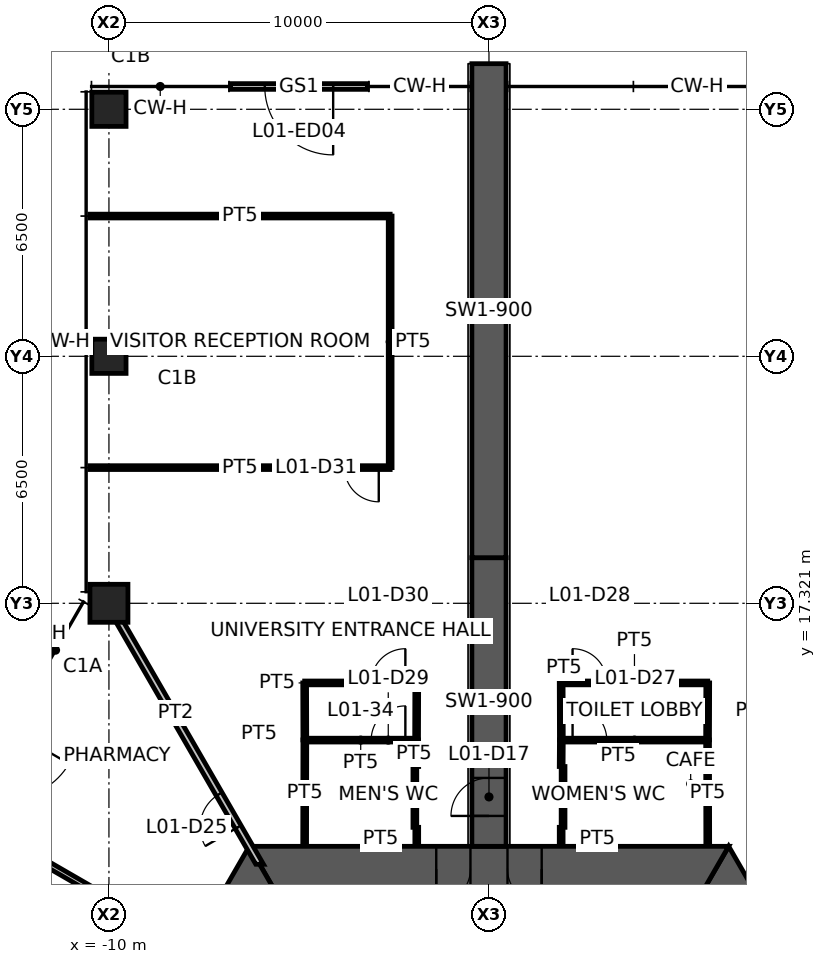
"""IFC4 building model, lengths in metres.
Left out: names, types, materials, properties, quantities, classifications, styles, units other than length and angle.
Written with IfcOpenShell. Run it as: python <this file> out.ifc"""

import sys

from ifc_helpers import new_model, si_unit, direction, frame, frame_2d, origin, origin_2d, place, context, subcontext, project, spatial, polyline, rectangle, hollow_rectangle, outline, extrude, element, fill, save


model = new_model("IFC4")
c1 = context("Model", 3, precision=1e-05, world=origin(), true_north=direction((0.0, 1.0)))
c2 = subcontext(c1, "Body", "Model", "MODEL_VIEW")
j1 = project(units=[si_unit("LENGTHUNIT", "METRE"), si_unit("PLANEANGLEUNIT", "RADIAN")], contexts=[c1])
p1 = place(None, origin())
s1 = spatial("IfcSite", under=j1, at=p1, CompositionType="ELEMENT")
p2 = place(p1, origin())
s2 = spatial("IfcBuilding", under=s1, at=p2, CompositionType="ELEMENT")
p3 = place(p2, origin())
s3 = spatial("IfcBuildingStorey", under=s2, at=p3, CompositionType="ELEMENT", Elevation=0.0)
p4 = place(p3, frame((-10.0, 17.321, 0.0), z_axis=(0.0, 0.0, 1.0), x_axis=(1.0, 0.0, 0.0)))
e1 = element("IfcColumn", 1, at=p4, inside=s3, PredefinedType="COLUMN", context=c2, shape_type="SweptSolid", body=[
    extrude(hollow_rectangle(XDim=1.0, YDim=1.0, WallThickness=0.06, at=origin_2d()), origin(), (0.0, 0.0, 1.0), 5.5),
])
for number, where, z_axis, x_axis in (
    (2, (-10.0, 23.821, 0.0), (0.0, 0.0, 1.0), (1.0, 0.0, 0.0)),
    (3, (-10.0, 30.321, 0.0), (0.0, 0.0, 1.0), (1.0, 0.0, 0.0)),
):
    element("IfcColumn", number, at=place(p3, frame(where, z_axis=z_axis, x_axis=x_axis)), inside=s3, PredefinedType="COLUMN", context=c2, shape_type="SweptSolid", body=[
        extrude(hollow_rectangle(XDim=0.9, YDim=0.9, WallThickness=0.05, at=origin_2d()), origin(), (0.0, 0.0, 1.0), 5.5),
    ])
p5 = place(p3, frame((11.922, 0.0, 0.0), z_axis=(0.0, 0.0, 1.0), x_axis=(-0.500004296715, 0.866022923061, 0.0)))
e4 = element("IfcWall", 4, at=p5, inside=s3, PredefinedType="SHEAR", context=c2, shape_type="SweptSolid", body=[
    extrude(outline(polyline([(-0.346, -0.6), (5.835, -0.6), (6.635, -0.6), (12.269, -0.6), (11.576, 0.6), (6.635, 0.6), (5.835, 0.6), (0.346, 0.6), (-0.346, -0.6)])), origin(), (0.0, 0.0, 1.0), 5.5),
])
p6 = place(p5, frame((5.835, 0.0, 0.0)))
e5 = element("IfcOpeningElement", 5, at=p6, cuts=e4, PredefinedType="OPENING", context=c2, shape_type="SweptSolid", body=[
    extrude(rectangle(XDim=0.8, YDim=2.1, at=frame_2d((0.4, 1.05))), frame((0.0, 0.61, 0.0), z_axis=(0.0, -1.0, 0.0), x_axis=(1.0, 0.0, 0.0)), (0.0, 0.0, 1.0), 1.22),
])
p7 = place(p3, frame((5.961, 10.325, 0.0), z_axis=(0.0, 0.0, 1.0), x_axis=(-1.0, 0.0, 0.0)))
e6 = element("IfcWall", 6, at=p7, inside=s3, PredefinedType="SHEAR", context=c2, shape_type="SweptSolid", body=[
    extrude(outline(polyline([(-0.346, -0.6), (4.574, -0.6), (5.474, -0.6), (6.449, -0.6), (7.349, -0.6), (12.269, -0.6), (11.576, 0.6), (7.349, 0.6), (6.449, 0.6), (5.474, 0.6), (4.574, 0.6), (0.346, 0.6), (-0.346, -0.6)])), origin(), (0.0, 0.0, 1.0), 5.5),
])
p8 = place(p7, frame((6.449, 0.0, 0.0)))
e7 = element("IfcOpeningElement", 7, at=p8, cuts=e6, PredefinedType="OPENING", context=c2, shape_type="SweptSolid", body=[
    extrude(rectangle(XDim=0.9, YDim=2.1, at=frame_2d((0.45, 1.05))), frame((0.0, 0.61, 0.0), z_axis=(0.0, -1.0, 0.0), x_axis=(1.0, 0.0, 0.0)), (0.0, 0.0, 1.0), 1.22),
])
p9 = place(p7, frame((4.574, 0.0, 0.0)))
e8 = element("IfcOpeningElement", 8, at=p9, cuts=e6, PredefinedType="OPENING", context=c2, shape_type="SweptSolid", body=[
    extrude(rectangle(XDim=0.9, YDim=2.1, at=frame_2d((0.45, 1.05))), frame((0.0, 0.61, 0.0), z_axis=(0.0, -1.0, 0.0), x_axis=(1.0, 0.0, 0.0)), (0.0, 0.0, 1.0), 1.22),
])
p10 = place(p3, frame((-5.961, 10.325, 0.0), z_axis=(0.0, 0.0, 1.0), x_axis=(-0.500004296715, -0.866022923061, 0.0)))
e9 = element("IfcWall", 9, at=p10, inside=s3, PredefinedType="SHEAR", context=c2, shape_type="SweptSolid", body=[
    extrude(outline(polyline([(-0.346, -0.6), (3.541, -0.6), (4.541, -0.6), (5.461, -0.6), (6.461, -0.6), (12.269, -0.6), (11.576, 0.6), (6.461, 0.6), (5.461, 0.6), (4.541, 0.6), (3.541, 0.6), (0.346, 0.6), (-0.346, -0.6)])), origin(), (0.0, 0.0, 1.0), 5.5),
])
p11 = place(p10, frame((3.541, 0.0, 0.0)))
e10 = element("IfcOpeningElement", 10, at=p11, cuts=e9, PredefinedType="OPENING", context=c2, shape_type="SweptSolid", body=[
    extrude(rectangle(XDim=1.0, YDim=2.1, at=frame_2d((0.5, 1.05))), frame((0.0, 0.61, 0.0), z_axis=(0.0, -1.0, 0.0), x_axis=(1.0, 0.0, 0.0)), (0.0, 0.0, 1.0), 1.22),
])
p12 = place(p10, frame((5.461, 0.0, 0.0)))
e11 = element("IfcOpeningElement", 11, at=p12, cuts=e9, PredefinedType="OPENING", context=c2, shape_type="SweptSolid", body=[
    extrude(rectangle(XDim=1.0, YDim=2.1, at=frame_2d((0.5, 1.05))), frame((0.0, 0.61, 0.0), z_axis=(0.0, -1.0, 0.0), x_axis=(1.0, 0.0, 0.0)), (0.0, 0.0, 1.0), 1.22),
])
p13 = place(p3, frame((0.0, 10.925, 0.0), z_axis=(0.0, 0.0, 1.0), x_axis=(0.0, 1.0, 0.0)))
e12 = element("IfcWall", 12, at=p13, inside=s3, PredefinedType="SHEAR", context=c2, shape_type="SweptSolid", body=[
    extrude(rectangle(XDim=7.595, YDim=0.9, at=frame_2d((3.798, 0.0))), origin(), (0.0, 0.0, 1.0), 5.5),
])
p14 = place(p13, frame((0.8, 0.0, 0.0)))
e13 = element("IfcOpeningElement", 13, at=p14, cuts=e12, PredefinedType="OPENING", context=c2, shape_type="SweptSolid", body=[
    extrude(rectangle(XDim=1.0, YDim=2.1, at=frame_2d((0.5, 1.05))), frame((0.0, 0.46, 0.0), z_axis=(0.0, -1.0, 0.0), x_axis=(1.0, 0.0, 0.0)), (0.0, 0.0, 1.0), 0.92),
])
p15 = place(p3, frame((0.0, 18.521, 0.0), z_axis=(0.0, 0.0, 1.0), x_axis=(0.0, 1.0, 0.0)))
e14 = element("IfcWall", 14, at=p15, inside=s3, PredefinedType="SHEAR", context=c2, shape_type="SweptSolid", body=[
    extrude(rectangle(XDim=13.0, YDim=0.9, at=frame_2d((6.5, 0.0))), origin(), (0.0, 0.0, 1.0), 5.5),
])
p16 = place(p3, frame((-3.2, 30.92, 0.0), z_axis=(0.0, 0.0, 1.0), x_axis=(-1.0, 0.0, 0.0)))
e15 = element("IfcWall", 15, at=p16, inside=s3, PredefinedType="STANDARD", context=c2, shape_type="SweptSolid", body=[
    extrude(rectangle(XDim=3.6, YDim=0.15, at=frame_2d((1.8, 0.0))), origin(), (0.0, 0.0, 1.0), 5.5),
])
p17 = place(p16, frame((0.9, 0.0, 0.0)))
e16 = element("IfcOpeningElement", 16, at=p17, cuts=e15, PredefinedType="OPENING", context=c2, shape_type="SweptSolid", body=[
    extrude(rectangle(XDim=1.8, YDim=2.4, at=frame_2d((0.9, 1.2))), frame((0.0, 0.085, 0.0), z_axis=(0.0, -1.0, 0.0), x_axis=(1.0, 0.0, 0.0)), (0.0, 0.0, 1.0), 0.17),
])
p18 = place(p3, frame((-6.035, 10.453, 0.0), z_axis=(0.0, 0.0, 1.0), x_axis=(-0.499993402427, 0.866029212861, 0.0)))
e17 = element("IfcWall", 17, at=p18, inside=s3, PredefinedType="PARTITIONING", context=c2, shape_type="SweptSolid", body=[
    extrude(outline(polyline([(-0.051, -0.087), (1.129, -0.087), (2.129, -0.087), (7.93, -0.087), (7.93, 0.087), (2.129, 0.087), (1.129, 0.087), (0.051, 0.087), (-0.051, -0.087)])), origin(), (0.0, 0.0, 1.0), 4.6),
])
p19 = place(p18, frame((1.129, 0.0, 0.0)))
e18 = element("IfcOpeningElement", 18, at=p19, cuts=e17, PredefinedType="OPENING", context=c2, shape_type="SweptSolid", body=[
    extrude(rectangle(XDim=1.0, YDim=2.1, at=frame_2d((0.5, 1.05))), frame((0.0, 0.098, 0.0), z_axis=(0.0, -1.0, 0.0), x_axis=(1.0, 0.0, 0.0)), (0.0, 0.0, 1.0), 0.195),
])
p20 = place(p3, frame((1.9, 13.72, 0.0), z_axis=(0.0, 0.0, 1.0), x_axis=(1.0, 0.0, 0.0)))
e19 = element("IfcWall", 19, at=p20, inside=s3, PredefinedType="PARTITIONING", context=c2, shape_type="SweptSolid", body=[
    extrude(rectangle(XDim=3.857, YDim=0.1, at=frame_2d((1.929, 0.0))), origin(), (0.0, 0.0, 1.0), 4.5),
])
p21 = place(p20, frame((0.3, 0.0, 0.0)))
e20 = element("IfcOpeningElement", 20, at=p21, cuts=e19, PredefinedType="OPENING", context=c2, shape_type="SweptSolid", body=[
    extrude(rectangle(XDim=0.9, YDim=2.1, at=frame_2d((0.45, 1.05))), frame((0.0, 0.06, 0.0), z_axis=(0.0, -1.0, 0.0), x_axis=(1.0, 0.0, 0.0)), (0.0, 0.0, 1.0), 0.12),
])
p22 = place(p3, frame((1.9, 10.945, 0.0), z_axis=(0.0, 0.0, 1.0), x_axis=(0.0, 1.0, 0.0)))
e21 = element("IfcWall", 21, at=p22, inside=s3, PredefinedType="PARTITIONING", context=c2, shape_type="SweptSolid", body=[
    extrude(rectangle(XDim=0.48, YDim=0.1, at=frame_2d((0.24, 0.0))), origin(), (0.0, 0.0, 1.0), 4.5),
])
p23 = place(p3, frame((1.9, 13.025, 0.0), z_axis=(0.0, 0.0, 1.0), x_axis=(0.006624680291, 0.999978056565, 0.0)))
e22 = element("IfcWall", 22, at=p23, inside=s3, PredefinedType="PARTITIONING", context=c2, shape_type="SweptSolid", body=[
    extrude(rectangle(XDim=0.7, YDim=0.1, at=frame_2d((0.35, 0.0))), origin(), (0.0, 0.0, 1.0), 4.5),
])
p24 = place(p3, frame((1.95, 11.425, 0.0), z_axis=(0.0, 0.0, 1.0), x_axis=(0.0, 1.0, 0.0)))
e23 = element("IfcWall", 23, at=p24, inside=s3, PredefinedType="PARTITIONING", context=c2, shape_type="SweptSolid", body=[
    extrude(rectangle(XDim=1.6, YDim=0.1, at=frame_2d((0.8, 0.0))), origin(), (0.0, 0.0, 1.0), 4.5),
])
p25 = place(p3, frame((5.752, 13.725, 0.0), z_axis=(0.0, 0.0, 1.0), x_axis=(0.001756386155, -0.999998457553, 0.0)))
e24 = element("IfcWall", 24, at=p25, inside=s3, PredefinedType="PARTITIONING", context=c2, shape_type="SweptSolid", body=[
    extrude(rectangle(XDim=2.78, YDim=0.1, at=frame_2d((1.39, 0.0))), origin(), (0.0, 0.0, 1.0), 4.5),
])
p26 = place(p3, frame((1.9, 15.225, 0.0), z_axis=(0.0, 0.0, 1.0), x_axis=(1.0, 0.0, 0.0)))
e25 = element("IfcWall", 25, at=p26, inside=s3, PredefinedType="PARTITIONING", context=c2, shape_type="SweptSolid", body=[
    extrude(rectangle(XDim=3.857, YDim=0.1, at=frame_2d((1.929, 0.0))), origin(), (0.0, 0.0, 1.0), 4.5),
])
p27 = place(p26, frame((0.3, 0.0, 0.0)))
e26 = element("IfcOpeningElement", 26, at=p27, cuts=e25, PredefinedType="OPENING", context=c2, shape_type="SweptSolid", body=[
    extrude(rectangle(XDim=0.9, YDim=2.1, at=frame_2d((0.45, 1.05))), frame((0.0, 0.06, 0.0), z_axis=(0.0, -1.0, 0.0), x_axis=(1.0, 0.0, 0.0)), (0.0, 0.0, 1.0), 0.12),
])
for number, where, z_axis, x_axis in (
    (27, (1.905, 13.725, 0.0), (0.0, 0.0, 1.0), (-0.003, 1.0, 0.0)),
    (28, (5.757, 15.225, 0.0), (0.0, 0.0, 1.0), (-0.003, -1.0, 0.0)),
):
    element("IfcWall", number, at=place(p3, frame(where, z_axis=z_axis, x_axis=x_axis)), inside=s3, PredefinedType="PARTITIONING", context=c2, shape_type="SweptSolid", body=[
        extrude(rectangle(XDim=1.5, YDim=0.1, at=frame_2d((0.75, 0.0))), origin(), (0.0, 0.0, 1.0), 4.5),
    ])
p28 = place(p3, frame((-4.85, 13.72, 0.0), z_axis=(0.0, 0.0, 1.0), x_axis=(1.0, 0.0, 0.0)))
e29 = element("IfcWall", 29, at=p28, inside=s3, PredefinedType="PARTITIONING", context=c2, shape_type="SweptSolid", body=[
    extrude(rectangle(XDim=2.95, YDim=0.1, at=frame_2d((1.475, 0.0))), origin(), (0.0, 0.0, 1.0), 4.5),
])
p29 = place(p28, frame((1.75, 0.0, 0.0)))
e30 = element("IfcOpeningElement", 30, at=p29, cuts=e29, PredefinedType="OPENING", context=c2, shape_type="SweptSolid", body=[
    extrude(rectangle(XDim=0.9, YDim=2.1, at=frame_2d((0.45, 1.05))), frame((0.0, 0.06, 0.0), z_axis=(0.0, -1.0, 0.0), x_axis=(1.0, 0.0, 0.0)), (0.0, 0.0, 1.0), 0.12),
])
p30 = place(p3, frame((-4.85, 10.945, 0.0), z_axis=(0.0, 0.0, 1.0), x_axis=(0.001756386155, 0.999998457553, 0.0)))
e31 = element("IfcWall", 31, at=p30, inside=s3, PredefinedType="PARTITIONING", context=c2, shape_type="SweptSolid", body=[
    extrude(rectangle(XDim=2.78, YDim=0.1, at=frame_2d((1.39, 0.0))), origin(), (0.0, 0.0, 1.0), 4.5),
])
p31 = place(p3, frame((-1.95, 13.025, 0.0), z_axis=(0.0, 0.0, 1.0), x_axis=(0.0, -1.0, 0.0)))
e32 = element("IfcWall", 32, at=p31, inside=s3, PredefinedType="PARTITIONING", context=c2, shape_type="SweptSolid", body=[
    extrude(rectangle(XDim=1.6, YDim=0.1, at=frame_2d((0.8, 0.0))), origin(), (0.0, 0.0, 1.0), 4.5),
])
p32 = place(p3, frame((-1.905, 13.725, 0.0), z_axis=(0.0, 0.0, 1.0), x_axis=(0.006624680291, -0.999978056565, 0.0)))
e33 = element("IfcWall", 33, at=p32, inside=s3, PredefinedType="PARTITIONING", context=c2, shape_type="SweptSolid", body=[
    extrude(rectangle(XDim=0.7, YDim=0.1, at=frame_2d((0.35, 0.0))), origin(), (0.0, 0.0, 1.0), 4.5),
])
p33 = place(p3, frame((-1.9, 11.425, 0.0), z_axis=(0.0, 0.0, 1.0), x_axis=(0.0, -1.0, 0.0)))
e34 = element("IfcWall", 34, at=p33, inside=s3, PredefinedType="PARTITIONING", context=c2, shape_type="SweptSolid", body=[
    extrude(rectangle(XDim=0.48, YDim=0.1, at=frame_2d((0.24, 0.0))), origin(), (0.0, 0.0, 1.0), 4.5),
])
p34 = place(p3, frame((-4.85, 15.225, 0.0), z_axis=(0.0, 0.0, 1.0), x_axis=(1.0, 0.0, 0.0)))
e35 = element("IfcWall", 35, at=p34, inside=s3, PredefinedType="PARTITIONING", context=c2, shape_type="SweptSolid", body=[
    extrude(rectangle(XDim=2.95, YDim=0.1, at=frame_2d((1.475, 0.0))), origin(), (0.0, 0.0, 1.0), 4.5),
])
p35 = place(p34, frame((1.75, 0.0, 0.0)))
e36 = element("IfcOpeningElement", 36, at=p35, cuts=e35, PredefinedType="OPENING", context=c2, shape_type="SweptSolid", body=[
    extrude(rectangle(XDim=0.9, YDim=2.1, at=frame_2d((0.45, 1.05))), frame((0.0, 0.06, 0.0), z_axis=(0.0, -1.0, 0.0), x_axis=(1.0, 0.0, 0.0)), (0.0, 0.0, 1.0), 0.12),
])
for number, where, z_axis, x_axis in (
    (37, (-4.845, 13.725, 0.0), (0.0, 0.0, 1.0), (-0.003, 1.0, 0.0)),
    (38, (-1.9, 15.225, 0.0), (0.0, 0.0, 1.0), (-0.003, -1.0, 0.0)),
):
    element("IfcWall", number, at=place(p3, frame(where, z_axis=z_axis, x_axis=x_axis)), inside=s3, PredefinedType="PARTITIONING", context=c2, shape_type="SweptSolid", body=[
        extrude(rectangle(XDim=1.5, YDim=0.1, at=frame_2d((0.75, 0.0))), origin(), (0.0, 0.0, 1.0), 4.5),
    ])
p36 = place(p3, frame((-10.5, 27.511, 0.0), z_axis=(0.0, 0.0, 1.0), x_axis=(1.0, 0.0, 0.0)))
e39 = element("IfcWall", 39, at=p36, inside=s3, PredefinedType="PARTITIONING", context=c2, shape_type="SweptSolid", body=[
    extrude(rectangle(XDim=7.9, YDim=0.1, at=frame_2d((3.95, 0.0))), origin(), (0.0, 0.0, 1.0), 4.5),
])
p37 = place(p3, frame((-2.6, 20.891, 0.0), z_axis=(0.0, 0.0, 1.0), x_axis=(-1.0, 0.0, 0.0)))
e40 = element("IfcWall", 40, at=p37, inside=s3, PredefinedType="PARTITIONING", context=c2, shape_type="SweptSolid", body=[
    extrude(rectangle(XDim=7.9, YDim=0.1, at=frame_2d((3.95, 0.0))), origin(), (0.0, 0.0, 1.0), 4.5),
])
p38 = place(p37, frame((0.3, 0.0, 0.0)))
e41 = element("IfcOpeningElement", 41, at=p38, cuts=e40, PredefinedType="OPENING", context=c2, shape_type="SweptSolid", body=[
    extrude(rectangle(XDim=0.9, YDim=2.1, at=frame_2d((0.45, 1.05))), frame((0.0, 0.06, 0.0), z_axis=(0.0, -1.0, 0.0), x_axis=(1.0, 0.0, 0.0)), (0.0, 0.0, 1.0), 0.12),
])
p39 = place(p3, frame((-2.6, 27.511, 0.0), z_axis=(0.0, 0.0, 1.0), x_axis=(0.0, -1.0, 0.0)))
e42 = element("IfcWall", 42, at=p39, inside=s3, PredefinedType="PARTITIONING", context=c2, shape_type="SweptSolid", body=[
    extrude(rectangle(XDim=6.62, YDim=0.1, at=frame_2d((3.31, 0.0))), origin(), (0.0, 0.0, 1.0), 4.5),
])
p40 = place(p3, frame((-7.838, 8.274, 0.0), z_axis=(0.0, 0.0, 1.0), x_axis=(-0.866012988868, 0.50002150265, 0.0)))
e43 = element("IfcWall", 43, at=p40, inside=s3, PredefinedType="PARTITIONING", context=c2, shape_type="SweptSolid", body=[
    extrude(rectangle(XDim=6.926, YDim=0.15, at=frame_2d((3.463, 0.0))), origin(), (0.0, 0.0, 1.0), 4.5),
])
p41 = place(p40, frame((2.246, 0.0, 0.0)))
e44 = element("IfcOpeningElement", 44, at=p41, cuts=e43, PredefinedType="OPENING", context=c2, shape_type="SweptSolid", body=[
    extrude(rectangle(XDim=1.0, YDim=2.1, at=frame_2d((0.5, 1.05))), frame((0.0, 0.085, 0.0), z_axis=(0.0, -1.0, 0.0), x_axis=(1.0, 0.0, 0.0)), (0.0, 0.0, 1.0), 0.17),
])
p42 = place(p17, origin())
e45 = element("IfcDoor", 45, at=p42, inside=s3, OperationType="DOUBLE_DOOR_SINGLE_SWING", PredefinedType="DOOR", context=c2, shape_type="SweptSolid", body=[
    extrude(rectangle(XDim=1.8, YDim=2.4, at=frame_2d((0.9, 1.2))), frame((0.0, 0.025, 0.0), z_axis=(0.0, -1.0, 0.0), x_axis=(1.0, 0.0, 0.0)), (0.0, 0.0, 1.0), 0.05),
])
fill(e16, e45)
p43 = place(p8, origin())
e46 = element("IfcDoor", 46, at=p43, inside=s3, OperationType="SINGLE_SWING_RIGHT", PredefinedType="DOOR", context=c2, shape_type="SweptSolid", body=[
    extrude(rectangle(XDim=0.9, YDim=2.1, at=frame_2d((0.45, 1.05))), frame((0.0, 0.025, 0.0), z_axis=(0.0, -1.0, 0.0), x_axis=(1.0, 0.0, 0.0)), (0.0, 0.0, 1.0), 0.05),
])
fill(e7, e46)
p44 = place(p9, origin())
e47 = element("IfcDoor", 47, at=p44, inside=s3, OperationType="SINGLE_SWING_LEFT", PredefinedType="DOOR", context=c2, shape_type="SweptSolid", body=[
    extrude(rectangle(XDim=0.9, YDim=2.1, at=frame_2d((0.45, 1.05))), frame((0.0, 0.025, 0.0), z_axis=(0.0, -1.0, 0.0), x_axis=(1.0, 0.0, 0.0)), (0.0, 0.0, 1.0), 0.05),
])
fill(e8, e47)
p45 = place(p14, origin())
e48 = element("IfcDoor", 48, at=p45, inside=s3, OperationType="SINGLE_SWING_LEFT", PredefinedType="DOOR", context=c2, shape_type="SweptSolid", body=[
    extrude(rectangle(XDim=1.0, YDim=2.1, at=frame_2d((0.5, 1.05))), frame((0.0, 0.025, 0.0), z_axis=(0.0, -1.0, 0.0), x_axis=(1.0, 0.0, 0.0)), (0.0, 0.0, 1.0), 0.05),
])
fill(e13, e48)
p46 = place(p19, origin())
e49 = element("IfcDoor", 49, at=p46, inside=s3, OperationType="SINGLE_SWING_LEFT", PredefinedType="DOOR", context=c2, shape_type="SweptSolid", body=[
    extrude(rectangle(XDim=1.0, YDim=2.1, at=frame_2d((0.5, 1.05))), frame((0.0, 0.025, 0.0), z_axis=(0.0, -1.0, 0.0), x_axis=(1.0, 0.0, 0.0)), (0.0, 0.0, 1.0), 0.05),
])
fill(e18, e49)
p47 = place(p21, origin())
e50 = element("IfcDoor", 50, at=p47, inside=s3, OperationType="SINGLE_SWING_LEFT", PredefinedType="DOOR", context=c2, shape_type="SweptSolid", body=[
    extrude(rectangle(XDim=0.9, YDim=2.1, at=frame_2d((0.45, 1.05))), frame((0.0, 0.025, 0.0), z_axis=(0.0, -1.0, 0.0), x_axis=(1.0, 0.0, 0.0)), (0.0, 0.0, 1.0), 0.05),
])
fill(e20, e50)
p48 = place(p27, origin())
e51 = element("IfcDoor", 51, at=p48, inside=s3, OperationType="SINGLE_SWING_LEFT", PredefinedType="DOOR", context=c2, shape_type="SweptSolid", body=[
    extrude(rectangle(XDim=0.9, YDim=2.1, at=frame_2d((0.45, 1.05))), frame((0.0, 0.025, 0.0), z_axis=(0.0, -1.0, 0.0), x_axis=(1.0, 0.0, 0.0)), (0.0, 0.0, 1.0), 0.05),
])
fill(e26, e51)
p49 = place(p29, origin())
e52 = element("IfcDoor", 52, at=p49, inside=s3, OperationType="SINGLE_SWING_RIGHT", PredefinedType="DOOR", context=c2, shape_type="SweptSolid", body=[
    extrude(rectangle(XDim=0.9, YDim=2.1, at=frame_2d((0.45, 1.05))), frame((0.0, 0.025, 0.0), z_axis=(0.0, -1.0, 0.0), x_axis=(1.0, 0.0, 0.0)), (0.0, 0.0, 1.0), 0.05),
])
fill(e30, e52)
p50 = place(p35, origin())
e53 = element("IfcDoor", 53, at=p50, inside=s3, OperationType="SINGLE_SWING_RIGHT", PredefinedType="DOOR", context=c2, shape_type="SweptSolid", body=[
    extrude(rectangle(XDim=0.9, YDim=2.1, at=frame_2d((0.45, 1.05))), frame((0.0, 0.025, 0.0), z_axis=(0.0, -1.0, 0.0), x_axis=(1.0, 0.0, 0.0)), (0.0, 0.0, 1.0), 0.05),
])
fill(e36, e53)
p51 = place(p38, origin())
e54 = element("IfcDoor", 54, at=p51, inside=s3, OperationType="SINGLE_SWING_LEFT", PredefinedType="DOOR", context=c2, shape_type="SweptSolid", body=[
    extrude(rectangle(XDim=0.9, YDim=2.1, at=frame_2d((0.45, 1.05))), frame((0.0, 0.025, 0.0), z_axis=(0.0, -1.0, 0.0), x_axis=(1.0, 0.0, 0.0)), (0.0, 0.0, 1.0), 0.05),
])
fill(e41, e54)
save(model, sys.argv[1])
